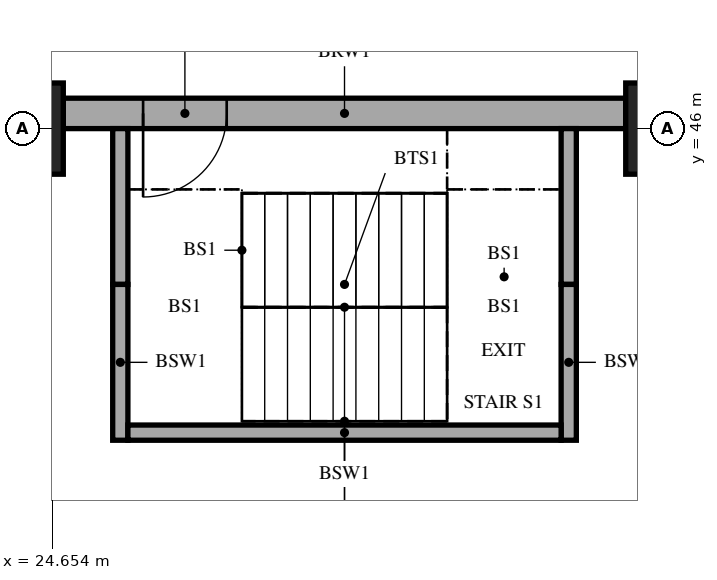
"""IFC4 building model, lengths in metres.
Left out: names, types, materials, properties, quantities, classifications, styles, units other than length and angle.
Written with IfcOpenShell. Run it as: python <this file> out.ifc"""

import sys

from ifc_helpers import new_model, si_unit, direction, frame, frame_2d, origin, origin_2d, place, context, subcontext, project, spatial, rectangle, extrude, element, fill, save


model = new_model("IFC4")
c1 = context("Model", 3, precision=1e-05, world=origin(), true_north=direction((0.0, 1.0)))
c2 = subcontext(c1, "Body", "Model", "MODEL_VIEW")
j1 = project(units=[si_unit("LENGTHUNIT", "METRE"), si_unit("PLANEANGLEUNIT", "RADIAN")], contexts=[c1])
p1 = place(None, origin())
s1 = spatial("IfcSite", under=j1, at=p1, CompositionType="ELEMENT")
p2 = place(p1, origin())
s2 = spatial("IfcBuilding", under=s1, at=p2, CompositionType="ELEMENT")
p3 = place(p2, frame((0.0, 0.0, -8.4)))
s3 = spatial("IfcBuildingStorey", under=s2, at=p3, CompositionType="ELEMENT", Elevation=-8.4)
for number, where, z_axis, x_axis in (
    (1, (24.0, 46.0, 0.0), (0.0, 0.0, 1.0), (1.0, 0.0, 0.0)),
    (2, (33.0, 46.0, 0.0), (0.0, 0.0, 1.0), (1.0, 0.0, 0.0)),
):
    element("IfcColumn", number, at=place(p3, frame(where, z_axis=z_axis, x_axis=x_axis)), inside=s3, PredefinedType="COLUMN", context=c2, shape_type="SweptSolid", body=[
        extrude(rectangle(XDim=1.6, YDim=1.2, at=origin_2d()), origin(), (0.0, 0.0, 1.0), 4.2),
    ])
p4 = place(p3, frame((24.8, 46.2, 0.0), z_axis=(0.0, 0.0, 1.0), x_axis=(1.0, 0.0, 0.0)))
e3 = element("IfcWall", 3, at=p4, inside=s3, PredefinedType="SOLIDWALL", context=c2, shape_type="SweptSolid", body=[
    extrude(rectangle(XDim=7.4, YDim=0.4, at=frame_2d((3.7, 0.0))), origin(), (0.0, 0.0, 1.0), 4.2),
])
p5 = place(p4, frame((1.05, 0.0, 0.0)))
e4 = element("IfcOpeningElement", 4, at=p5, cuts=e3, PredefinedType="OPENING", context=c2, shape_type="SweptSolid", body=[
    extrude(rectangle(XDim=1.1, YDim=2.1, at=frame_2d((0.55, 1.05))), frame((0.0, 0.21, 0.0), z_axis=(0.0, -1.0, 0.0), x_axis=(1.0, 0.0, 0.0)), (0.0, 0.0, 1.0), 0.42),
])
for number, where, z_axis, x_axis in (
    (5, (25.55, 46.0, 0.0), (0.0, 0.0, 1.0), (0.0, -1.0, 0.0)),
    (6, (25.55, 43.95, 0.0), (0.0, 0.0, 1.0), (0.0, -1.0, 0.0)),
    (7, (31.45, 46.0, 0.0), (0.0, 0.0, 1.0), (0.0, -1.0, 0.0)),
    (8, (31.45, 43.95, 0.0), (0.0, 0.0, 1.0), (0.0, -1.0, 0.0)),
):
    element("IfcWall", number, at=place(p3, frame(where, z_axis=z_axis, x_axis=x_axis)), inside=s3, PredefinedType="SOLIDWALL", context=c2, shape_type="SweptSolid", body=[
        extrude(rectangle(XDim=2.05, YDim=0.2, at=frame_2d((1.025, 0.0))), origin(), (0.0, 0.0, 1.0), 4.2),
    ])
p6 = place(p3, frame((25.65, 42.0, 0.0), z_axis=(0.0, 0.0, 1.0), x_axis=(1.0, 0.0, 0.0)))
e9 = element("IfcWall", 9, at=p6, inside=s3, PredefinedType="SOLIDWALL", context=c2, shape_type="SweptSolid", body=[
    extrude(rectangle(XDim=5.7, YDim=0.2, at=frame_2d((2.85, 0.0))), origin(), (0.0, 0.0, 1.0), 4.2),
])
p7 = place(p5, frame((1.1, 0.0, 0.0), z_axis=(0.0, 0.0, 1.0), x_axis=(-1.0, 0.0, 0.0)))
e10 = element("IfcDoor", 10, at=p7, inside=s3, OperationType="SINGLE_SWING_RIGHT", PredefinedType="DOOR", context=c2, shape_type="SweptSolid", body=[
    extrude(rectangle(XDim=1.1, YDim=2.1, at=frame_2d((0.55, 1.05))), frame((0.0, 0.025, 0.0), z_axis=(0.0, -1.0, 0.0), x_axis=(1.0, 0.0, 0.0)), (0.0, 0.0, 1.0), 0.05),
])
fill(e4, e10)
save(model, sys.argv[1])
